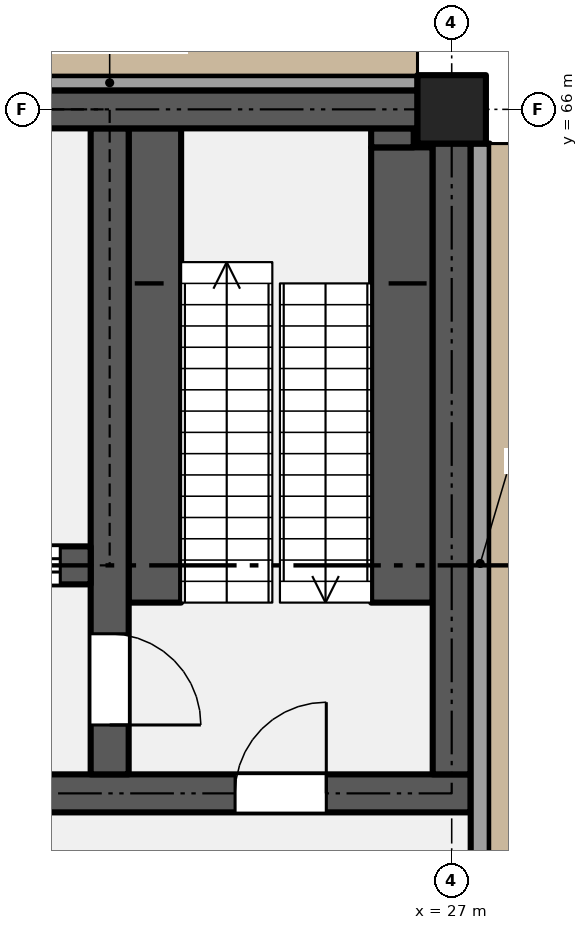
"""IFC4 building model, lengths in metres.
Left out: names, types, materials, properties, quantities, classifications, styles, units other than length and angle.
Written with IfcOpenShell. Run it as: python <this file> out.ifc"""

import sys

from ifc_helpers import new_model, si_unit, direction, frame, frame_2d, origin, origin_2d, place, context, subcontext, project, spatial, rectangle, extrude, element, fill, save


model = new_model("IFC4")
c1 = context("Model", 3, precision=1e-05, world=origin(), true_north=direction((0.0, 1.0)))
c2 = subcontext(c1, "Body", "Model", "MODEL_VIEW")
j1 = project(units=[si_unit("LENGTHUNIT", "METRE"), si_unit("PLANEANGLEUNIT", "RADIAN")], contexts=[c1])
p1 = place(None, origin())
s1 = spatial("IfcSite", under=j1, at=p1, CompositionType="ELEMENT")
p2 = place(p1, origin())
s2 = spatial("IfcBuilding", under=s1, at=p2, CompositionType="ELEMENT")
p3 = place(p2, frame((0.0, 0.0, 12.0)))
s3 = spatial("IfcBuildingStorey", under=s2, at=p3, CompositionType="ELEMENT", Elevation=12.0)
p4 = place(p3, frame((27.0, 66.0, 0.0), z_axis=(0.0, 0.0, 1.0), x_axis=(1.0, 0.0, 0.0)))
e1 = element("IfcColumn", 1, at=p4, inside=s3, PredefinedType="COLUMN", context=c2, shape_type="SweptSolid", body=[
    extrude(rectangle(XDim=0.9, YDim=0.9, at=origin_2d()), origin(), (0.0, 0.0, 1.0), 5.4),
])
p5 = place(p3, frame((17.75, 57.0, 0.0), z_axis=(0.0, 0.0, 1.0), x_axis=(1.0, 0.0, 0.0)))
e2 = element("IfcWall", 2, at=p5, inside=s3, PredefinedType="SHEAR", context=c2, shape_type="SweptSolid", body=[
    extrude(rectangle(XDim=9.5, YDim=0.5, at=frame_2d((4.75, 0.0))), origin(), (0.0, 0.0, 1.0), 5.15),
])
p6 = place(p5, frame((3.1, 0.0, 0.0), z_axis=(0.0, 0.0, 1.0), x_axis=(-1.0, 0.0, 0.0)))
e3 = element("IfcOpeningElement", 3, at=p6, cuts=e2, PredefinedType="OPENING", context=c2, shape_type="SweptSolid", body=[
    extrude(rectangle(XDim=1.2, YDim=2.1, at=frame_2d((0.6, 1.05))), frame((0.0, 0.26, 0.0), z_axis=(0.0, -1.0, 0.0), x_axis=(1.0, 0.0, 0.0)), (0.0, 0.0, 1.0), 0.52),
])
p7 = place(p5, frame((6.4, 0.0, 0.0)))
e4 = element("IfcOpeningElement", 4, at=p7, cuts=e2, PredefinedType="OPENING", context=c2, shape_type="SweptSolid", body=[
    extrude(rectangle(XDim=1.2, YDim=2.1, at=frame_2d((0.6, 1.05))), frame((0.0, 0.26, 0.0), z_axis=(0.0, -1.0, 0.0), x_axis=(1.0, 0.0, 0.0)), (0.0, 0.0, 1.0), 0.52),
])
p8 = place(p3, frame((22.5, 57.25, 0.0), z_axis=(0.0, 0.0, 1.0), x_axis=(0.0, 1.0, 0.0)))
e5 = element("IfcWall", 5, at=p8, inside=s3, PredefinedType="SHEAR", context=c2, shape_type="SweptSolid", body=[
    extrude(rectangle(XDim=8.5, YDim=0.5, at=frame_2d((4.25, 0.0))), origin(), (0.0, 0.0, 1.0), 5.15),
])
p9 = place(p8, frame((1.85, 0.0, 0.0), z_axis=(0.0, 0.0, 1.0), x_axis=(-1.0, 0.0, 0.0)))
e6 = element("IfcOpeningElement", 6, at=p9, cuts=e5, PredefinedType="OPENING", context=c2, shape_type="SweptSolid", body=[
    extrude(rectangle(XDim=1.2, YDim=2.1, at=frame_2d((0.6, 1.05))), frame((0.0, 0.26, 0.0), z_axis=(0.0, -1.0, 0.0), x_axis=(1.0, 0.0, 0.0)), (0.0, 0.0, 1.0), 0.52),
])
p10 = place(p3, frame((27.0, 57.25, 0.0), z_axis=(0.0, 0.0, 1.0), x_axis=(0.0, 1.0, 0.0)))
e7 = element("IfcWall", 7, at=p10, inside=s3, PredefinedType="SHEAR", context=c2, shape_type="SweptSolid", body=[
    extrude(rectangle(XDim=8.3, YDim=0.5, at=frame_2d((4.15, 0.0))), origin(), (0.0, 0.0, 1.0), 5.15),
])
p11 = place(p3, frame((18.25, 60.0, 0.0), z_axis=(0.0, 0.0, 1.0), x_axis=(1.0, 0.0, 0.0)))
e8 = element("IfcWall", 8, at=p11, inside=s3, PredefinedType="SHEAR", context=c2, shape_type="SweptSolid", body=[
    extrude(rectangle(XDim=4.0, YDim=0.5, at=frame_2d((2.0, 0.0))), origin(), (0.0, 0.0, 1.0), 5.15),
])
p12 = place(p11, frame((0.35, 0.0, 0.0)))
e9 = element("IfcOpeningElement", 9, at=p12, cuts=e8, PredefinedType="OPENING", context=c2, shape_type="SweptSolid", body=[
    extrude(rectangle(XDim=1.1, YDim=2.1, at=frame_2d((0.55, 1.05))), frame((0.0, 0.26, 0.0), z_axis=(0.0, -1.0, 0.0), x_axis=(1.0, 0.0, 0.0)), (0.0, 0.0, 1.0), 0.52),
])
p13 = place(p11, frame((2.5, 0.0, 0.0)))
e10 = element("IfcOpeningElement", 10, at=p13, cuts=e8, PredefinedType="OPENING", context=c2, shape_type="SweptSolid", body=[
    extrude(rectangle(XDim=1.1, YDim=2.1, at=frame_2d((0.55, 1.05))), frame((0.0, 0.26, 0.0), z_axis=(0.0, -1.0, 0.0), x_axis=(1.0, 0.0, 0.0)), (0.0, 0.0, 1.0), 0.52),
])
p14 = place(p3, frame((18.45, 66.0, 0.0), z_axis=(0.0, 0.0, 1.0), x_axis=(1.0, 0.0, 0.0)))
e11 = element("IfcWall", 11, at=p14, inside=s3, PredefinedType="SHEAR", context=c2, shape_type="SweptSolid", body=[
    extrude(rectangle(XDim=8.1, YDim=0.5, at=frame_2d((4.05, 0.0))), origin(), (0.0, 0.0, 1.0), 5.15),
])
p15 = place(p3, frame((18.45, 66.35, 0.0), z_axis=(0.0, 0.0, 1.0), x_axis=(1.0, 0.0, 0.0)))
e12 = element("IfcWall", 12, at=p15, inside=s3, PredefinedType="SOLIDWALL", context=c2, shape_type="SweptSolid", body=[
    extrude(rectangle(XDim=8.1, YDim=0.2, at=frame_2d((4.05, 0.0))), origin(), (0.0, 0.0, 1.0), 5.15),
])
p16 = place(p3, frame((27.375, 54.5, 0.0), z_axis=(0.0, 0.0, 1.0), x_axis=(0.0, 1.0, 0.0)))
e13 = element("IfcWall", 13, at=p16, inside=s3, PredefinedType="SOLIDWALL", context=c2, shape_type="SweptSolid", body=[
    extrude(rectangle(XDim=11.05, YDim=0.25, at=frame_2d((5.525, 0.0))), origin(), (0.0, 0.0, 1.0), 5.15),
])
p17 = place(p16, frame((0.4, 0.0, 0.9)))
e14 = element("IfcOpeningElement", 14, at=p17, cuts=e13, PredefinedType="OPENING", context=c2, shape_type="SweptSolid", body=[
    extrude(rectangle(XDim=1.2, YDim=2.4, at=frame_2d((0.6, 1.2))), frame((0.0, 0.135, 0.0), z_axis=(0.0, -1.0, 0.0), x_axis=(1.0, 0.0, 0.0)), (0.0, 0.0, 1.0), 0.27),
])
p18 = place(p3, frame((23.095, 59.51, 0.0), z_axis=(0.0, 0.0, 1.0), x_axis=(0.0, 1.0, 0.0)))
e15 = element("IfcWall", 15, at=p18, inside=s3, PredefinedType="SHEAR", context=c2, shape_type="SweptSolid", body=[
    extrude(rectangle(XDim=6.24, YDim=0.69, at=frame_2d((3.12, 0.0))), origin(), (0.0, 0.0, 1.0), 2.587),
])
p19 = place(p3, frame((26.345, 59.51, 0.0), z_axis=(0.0, 0.0, 1.0), x_axis=(0.0, 1.0, 0.0)))
e16 = element("IfcWall", 16, at=p19, inside=s3, PredefinedType="SHEAR", context=c2, shape_type="SweptSolid", body=[
    extrude(rectangle(XDim=5.99, YDim=0.81, at=frame_2d((2.995, 0.0))), origin(), (0.0, 0.0, 1.0), 2.587),
])
p20 = place(p3, frame((26.22, 65.5, 0.0), z_axis=(0.0, 0.0, 1.0), x_axis=(0.0, 1.0, 0.0)))
e17 = element("IfcWall", 17, at=p20, inside=s3, PredefinedType="SHEAR", context=c2, shape_type="SweptSolid", body=[
    extrude(rectangle(XDim=0.25, YDim=0.56, at=frame_2d((0.125, 0.0))), origin(), (0.0, 0.0, 1.0), 2.587),
])
p21 = place(p13, origin())
e18 = element("IfcDoor", 18, at=p21, inside=s3, OperationType="SLIDING_TO_LEFT", PredefinedType="DOOR", context=c2, shape_type="SweptSolid", body=[
    extrude(rectangle(XDim=1.1, YDim=2.1, at=frame_2d((0.55, 1.05))), frame((0.0, 0.025, 0.0), z_axis=(0.0, -1.0, 0.0), x_axis=(1.0, 0.0, 0.0)), (0.0, 0.0, 1.0), 0.05),
])
fill(e10, e18)
p22 = place(p9, origin())
e19 = element("IfcDoor", 19, at=p22, inside=s3, OperationType="SINGLE_SWING_RIGHT", PredefinedType="DOOR", context=c2, shape_type="SweptSolid", body=[
    extrude(rectangle(XDim=1.2, YDim=2.1, at=frame_2d((0.6, 1.05))), frame((0.0, 0.025, 0.0), z_axis=(0.0, -1.0, 0.0), x_axis=(1.0, 0.0, 0.0)), (0.0, 0.0, 1.0), 0.05),
])
fill(e6, e19)
p23 = place(p7, origin())
e20 = element("IfcDoor", 20, at=p23, inside=s3, OperationType="SINGLE_SWING_RIGHT", PredefinedType="DOOR", context=c2, shape_type="SweptSolid", body=[
    extrude(rectangle(XDim=1.2, YDim=2.1, at=frame_2d((0.6, 1.05))), frame((0.0, 0.025, 0.0), z_axis=(0.0, -1.0, 0.0), x_axis=(1.0, 0.0, 0.0)), (0.0, 0.0, 1.0), 0.05),
])
fill(e4, e20)
save(model, sys.argv[1])
